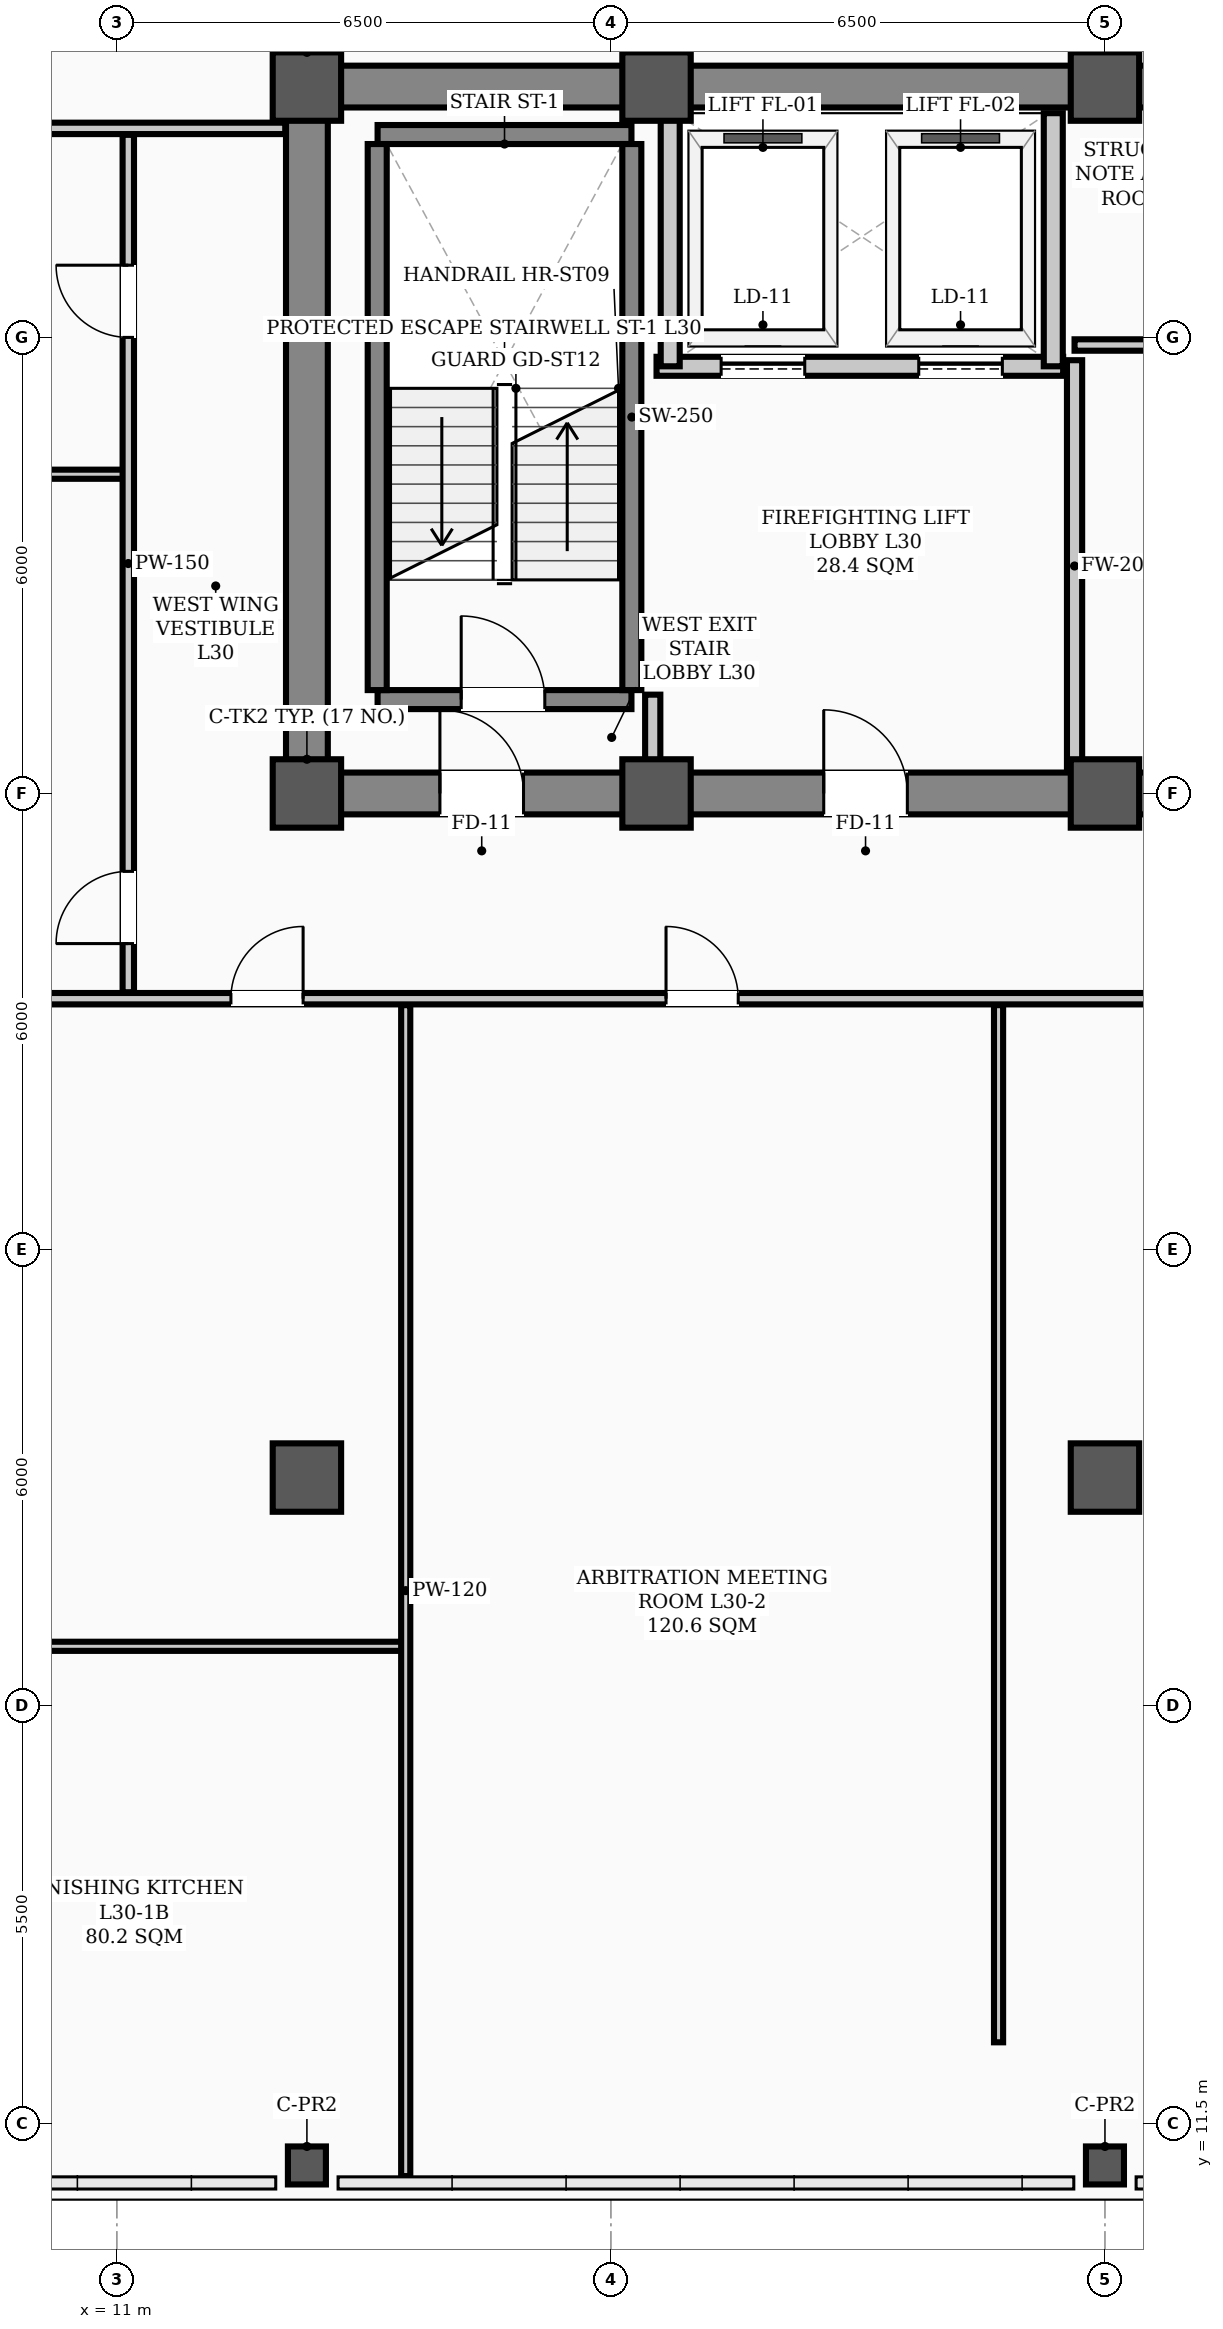
"""IFC4 building model, lengths in metres.
Left out: names, types, materials, properties, quantities, classifications, styles, units other than length and angle.
Written with IfcOpenShell. Run it as: python <this file> out.ifc"""

import sys

from ifc_helpers import new_model, si_unit, direction, frame, frame_2d, origin, origin_2d, place, context, subcontext, project, spatial, rectangle, hollow_rectangle, extrude, element, fill, save


model = new_model("IFC4")
c1 = context("Model", 3, precision=1e-05, world=origin(), true_north=direction((0.0, 1.0)))
c2 = subcontext(c1, "Body", "Model", "MODEL_VIEW")
j1 = project(units=[si_unit("LENGTHUNIT", "METRE"), si_unit("PLANEANGLEUNIT", "RADIAN")], contexts=[c1])
p1 = place(None, origin())
s1 = spatial("IfcSite", under=j1, at=p1, CompositionType="ELEMENT")
p2 = place(p1, origin())
s2 = spatial("IfcBuilding", under=s1, at=p2, CompositionType="ELEMENT")
p3 = place(p2, frame((0.0, 0.0, 122.7)))
s3 = spatial("IfcBuildingStorey", under=s2, at=p3, CompositionType="ELEMENT", Elevation=122.7)
for number, where, z_axis, x_axis in (
    (1, (13.5, 29.0, 0.0), (0.0, 0.0, 1.0), (1.0, 0.0, 0.0)),
    (2, (13.5, 38.3, 0.0), (0.0, 0.0, 1.0), (1.0, 0.0, 0.0)),
    (3, (18.1, 29.0, 0.0), (0.0, 0.0, 1.0), (1.0, 0.0, 0.0)),
    (4, (18.1, 38.3, 0.0), (0.0, 0.0, 1.0), (1.0, 0.0, 0.0)),
    (5, (24.0, 29.0, 0.0), (0.0, 0.0, 1.0), (1.0, 0.0, 0.0)),
    (6, (24.0, 38.3, 0.0), (0.0, 0.0, 1.0), (1.0, 0.0, 0.0)),
    (7, (13.5, 20.0, 0.0), (0.0, 0.0, 1.0), (1.0, 0.0, 0.0)),
    (8, (24.0, 20.0, 0.0), (0.0, 0.0, 1.0), (1.0, 0.0, 0.0)),
):
    element("IfcColumn", number, at=place(p3, frame(where, z_axis=z_axis, x_axis=x_axis)), inside=s3, PredefinedType="COLUMN", context=c2, shape_type="SweptSolid", body=[
        extrude(hollow_rectangle(XDim=0.9, YDim=0.9, WallThickness=0.035, InnerFilletRadius=0.017, OuterFilletRadius=0.052, at=origin_2d()), origin(), (0.0, 0.0, 1.0), 3.9),
    ])
for number, where, z_axis, x_axis in (
    (9, (13.5, 10.95, 0.0), (0.0, 0.0, 1.0), (1.0, 0.0, 0.0)),
    (10, (24.0, 10.95, 0.0), (0.0, 0.0, 1.0), (1.0, 0.0, 0.0)),
):
    element("IfcColumn", number, at=place(p3, frame(where, z_axis=z_axis, x_axis=x_axis)), inside=s3, PredefinedType="COLUMN", context=c2, shape_type="SweptSolid", body=[
        extrude(hollow_rectangle(XDim=0.5, YDim=0.5, WallThickness=0.024, InnerFilletRadius=0.012, OuterFilletRadius=0.036, at=origin_2d()), origin(), (0.0, 0.0, 1.0), 3.9),
    ])
p4 = place(p3, frame((13.5, 29.0, 0.0), z_axis=(0.0, 0.0, 1.0), x_axis=(1.0, 0.0, 0.0)))
e11 = element("IfcWall", 11, at=p4, inside=s3, PredefinedType="SHEAR", context=c2, shape_type="SweptSolid", body=[
    extrude(rectangle(XDim=30.5, YDim=0.55, at=frame_2d((15.25, 0.0))), origin(), (0.0, 0.0, 1.0), 3.72),
])
p5 = place(p4, frame((1.75, 0.0, 0.0)))
e12 = element("IfcOpeningElement", 12, at=p5, cuts=e11, PredefinedType="OPENING", context=c2, shape_type="SweptSolid", body=[
    extrude(rectangle(XDim=1.1, YDim=2.08, at=frame_2d((0.55, 1.04))), frame((0.0, 0.285, 0.0), z_axis=(0.0, -1.0, 0.0), x_axis=(1.0, 0.0, 0.0)), (0.0, 0.0, 1.0), 0.57),
])
p6 = place(p4, frame((26.7, 0.0, 0.0)))
e13 = element("IfcOpeningElement", 13, at=p6, cuts=e11, PredefinedType="OPENING", context=c2, shape_type="SweptSolid", body=[
    extrude(rectangle(XDim=1.1, YDim=2.08, at=frame_2d((0.55, 1.04))), frame((0.0, 0.285, 0.0), z_axis=(0.0, -1.0, 0.0), x_axis=(1.0, 0.0, 0.0)), (0.0, 0.0, 1.0), 0.57),
])
p7 = place(p4, frame((6.8, 0.0, 0.0)))
e14 = element("IfcOpeningElement", 14, at=p7, cuts=e11, PredefinedType="OPENING", context=c2, shape_type="SweptSolid", body=[
    extrude(rectangle(XDim=1.1, YDim=2.08, at=frame_2d((0.55, 1.04))), frame((0.0, 0.285, 0.0), z_axis=(0.0, -1.0, 0.0), x_axis=(1.0, 0.0, 0.0)), (0.0, 0.0, 1.0), 0.57),
])
p8 = place(p4, frame((13.2, 0.0, 0.0)))
e15 = element("IfcOpeningElement", 15, at=p8, cuts=e11, PredefinedType="OPENING", context=c2, shape_type="SweptSolid", body=[
    extrude(rectangle(XDim=1.6, YDim=2.08, at=frame_2d((0.8, 1.04))), frame((0.0, 0.285, 0.0), z_axis=(0.0, -1.0, 0.0), x_axis=(1.0, 0.0, 0.0)), (0.0, 0.0, 1.0), 0.57),
])
p9 = place(p4, frame((20.525, 0.0, 0.0)))
e16 = element("IfcOpeningElement", 16, at=p9, cuts=e11, PredefinedType="OPENING", context=c2, shape_type="SweptSolid", body=[
    extrude(rectangle(XDim=0.95, YDim=2.08, at=frame_2d((0.475, 1.04))), frame((0.0, 0.285, 0.0), z_axis=(0.0, -1.0, 0.0), x_axis=(1.0, 0.0, 0.0)), (0.0, 0.0, 1.0), 0.57),
])
p10 = place(p3, frame((13.5, 38.3, 0.0), z_axis=(0.0, 0.0, 1.0), x_axis=(1.0, 0.0, 0.0)))
e17 = element("IfcWall", 17, at=p10, inside=s3, PredefinedType="SHEAR", context=c2, shape_type="SweptSolid", body=[
    extrude(rectangle(XDim=30.5, YDim=0.55, at=frame_2d((15.25, 0.0))), origin(), (0.0, 0.0, 1.0), 3.72),
])
p11 = place(p3, frame((13.5, 29.35, 0.0), z_axis=(0.0, 0.0, 1.0), x_axis=(0.0, 1.0, 0.0)))
e18 = element("IfcWall", 18, at=p11, inside=s3, PredefinedType="SHEAR", context=c2, shape_type="SweptSolid", body=[
    extrude(rectangle(XDim=8.6, YDim=0.55, at=frame_2d((4.3, 0.0))), origin(), (0.0, 0.0, 1.0), 3.72),
])
p12 = place(p3, frame((14.43, 30.235, 0.0), z_axis=(0.0, 0.0, 1.0), x_axis=(1.0, 0.0, 0.0)))
e19 = element("IfcWall", 19, at=p12, inside=s3, PredefinedType="STANDARD", context=c2, shape_type="SweptSolid", body=[
    extrude(rectangle(XDim=3.34, YDim=0.25, at=frame_2d((1.67, 0.0))), origin(), (0.0, 0.0, 1.0), 3.72),
])
p13 = place(p12, frame((1.1, 0.0, 0.0)))
e20 = element("IfcOpeningElement", 20, at=p13, cuts=e19, PredefinedType="OPENING", context=c2, shape_type="SweptSolid", body=[
    extrude(rectangle(XDim=1.1, YDim=2.08, at=frame_2d((0.55, 1.04))), frame((0.0, 0.135, 0.0), z_axis=(0.0, -1.0, 0.0), x_axis=(1.0, 0.0, 0.0)), (0.0, 0.0, 1.0), 0.27),
])
p14 = place(p3, frame((14.43, 37.669, 0.0), z_axis=(0.0, 0.0, 1.0), x_axis=(1.0, 0.0, 0.0)))
e21 = element("IfcWall", 21, at=p14, inside=s3, PredefinedType="STANDARD", context=c2, shape_type="SweptSolid", body=[
    extrude(rectangle(XDim=3.34, YDim=0.25, at=frame_2d((1.67, 0.0))), origin(), (0.0, 0.0, 1.0), 3.72),
])
for number, where, z_axis, x_axis in (
    (22, (14.425, 30.36, 0.0), (0.0, 0.0, 1.0), (0.0, 1.0, 0.0)),
    (23, (17.775, 30.36, 0.0), (0.0, 0.0, 1.0), (0.0, 1.0, 0.0)),
):
    element("IfcWall", number, at=place(p3, frame(where, z_axis=z_axis, x_axis=x_axis)), inside=s3, PredefinedType="STANDARD", context=c2, shape_type="SweptSolid", body=[
        extrude(rectangle(XDim=7.184, YDim=0.25, at=frame_2d((3.592, 0.0))), origin(), (0.0, 0.0, 1.0), 3.72),
    ])
p15 = place(p3, frame((18.1, 34.62, 0.0), z_axis=(0.0, 0.0, 1.0), x_axis=(1.0, 0.0, 0.0)))
e24 = element("IfcWall", 24, at=p15, inside=s3, PredefinedType="STANDARD", context=c2, shape_type="SweptSolid", body=[
    extrude(rectangle(XDim=5.35, YDim=0.25, at=frame_2d((2.675, 0.0))), origin(), (0.0, 0.0, 1.0), 3.72),
])
p16 = place(p15, frame((0.85, 0.0, 0.0)))
e25 = element("IfcOpeningElement", 25, at=p16, cuts=e24, PredefinedType="OPENING", context=c2, shape_type="SweptSolid", body=[
    extrude(rectangle(XDim=1.1, YDim=2.08, at=frame_2d((0.55, 1.04))), frame((0.0, 0.135, 0.0), z_axis=(0.0, -1.0, 0.0), x_axis=(1.0, 0.0, 0.0)), (0.0, 0.0, 1.0), 0.27),
])
p17 = place(p15, frame((3.45, 0.0, 0.0)))
e26 = element("IfcOpeningElement", 26, at=p17, cuts=e24, PredefinedType="OPENING", context=c2, shape_type="SweptSolid", body=[
    extrude(rectangle(XDim=1.1, YDim=2.08, at=frame_2d((0.55, 1.04))), frame((0.0, 0.135, 0.0), z_axis=(0.0, -1.0, 0.0), x_axis=(1.0, 0.0, 0.0)), (0.0, 0.0, 1.0), 0.27),
])
for number, where, z_axis, x_axis in (
    (27, (18.28, 34.62, 0.0), (0.0, 0.0, 1.0), (0.0, 1.0, 0.0)),
    (28, (23.32, 34.62, 0.0), (0.0, 0.0, 1.0), (0.0, 1.0, 0.0)),
):
    element("IfcWall", number, at=place(p3, frame(where, z_axis=z_axis, x_axis=x_axis)), inside=s3, PredefinedType="STANDARD", context=c2, shape_type="SweptSolid", body=[
        extrude(rectangle(XDim=3.33, YDim=0.25, at=frame_2d((1.665, 0.0))), origin(), (0.0, 0.0, 1.0), 3.72),
    ])
p18 = place(p3, frame((23.6, 34.9, 0.0), z_axis=(0.0, 0.0, 1.0), x_axis=(1.0, 0.0, 0.0)))
e29 = element("IfcWall", 29, at=p18, inside=s3, PredefinedType="PARTITIONING", context=c2, shape_type="SweptSolid", body=[
    extrude(rectangle(XDim=4.58, YDim=0.15, at=frame_2d((2.29, 0.0))), origin(), (0.0, 0.0, 1.0), 3.72),
])
p19 = place(p18, frame((1.875, 0.0, 0.0)))
e30 = element("IfcOpeningElement", 30, at=p19, cuts=e29, PredefinedType="OPENING", context=c2, shape_type="SweptSolid", body=[
    extrude(rectangle(XDim=0.95, YDim=2.08, at=frame_2d((0.475, 1.04))), frame((0.0, 0.085, 0.0), z_axis=(0.0, -1.0, 0.0), x_axis=(1.0, 0.0, 0.0)), (0.0, 0.0, 1.0), 0.17),
])
p20 = place(p3, frame((2.31, 26.3, 0.0), z_axis=(0.0, 0.0, 1.0), x_axis=(1.0, 0.0, 0.0)))
e31 = element("IfcWall", 31, at=p20, inside=s3, PredefinedType="PARTITIONING", context=c2, shape_type="SweptSolid", body=[
    extrude(rectangle(XDim=46.38, YDim=0.15, at=frame_2d((23.19, 0.0))), origin(), (0.0, 0.0, 1.0), 3.1),
])
p21 = place(p20, frame((10.19, 0.0, 0.0)))
e32 = element("IfcOpeningElement", 32, at=p21, cuts=e31, PredefinedType="OPENING", context=c2, shape_type="SweptSolid", body=[
    extrude(rectangle(XDim=0.95, YDim=2.08, at=frame_2d((0.475, 1.04))), frame((0.0, 0.085, 0.0), z_axis=(0.0, -1.0, 0.0), x_axis=(1.0, 0.0, 0.0)), (0.0, 0.0, 1.0), 0.17),
])
p22 = place(p20, frame((15.915, 0.0, 0.0)))
e33 = element("IfcOpeningElement", 33, at=p22, cuts=e31, PredefinedType="OPENING", context=c2, shape_type="SweptSolid", body=[
    extrude(rectangle(XDim=0.95, YDim=2.08, at=frame_2d((0.475, 1.04))), frame((0.0, 0.085, 0.0), z_axis=(0.0, -1.0, 0.0), x_axis=(1.0, 0.0, 0.0)), (0.0, 0.0, 1.0), 0.17),
])
p23 = place(p20, frame((24.115, 0.0, 0.0)))
e34 = element("IfcOpeningElement", 34, at=p23, cuts=e31, PredefinedType="OPENING", context=c2, shape_type="SweptSolid", body=[
    extrude(rectangle(XDim=0.95, YDim=2.08, at=frame_2d((0.475, 1.04))), frame((0.0, 0.085, 0.0), z_axis=(0.0, -1.0, 0.0), x_axis=(1.0, 0.0, 0.0)), (0.0, 0.0, 1.0), 0.17),
])
p24 = place(p20, frame((32.515, 0.0, 0.0)))
e35 = element("IfcOpeningElement", 35, at=p24, cuts=e31, PredefinedType="OPENING", context=c2, shape_type="SweptSolid", body=[
    extrude(rectangle(XDim=0.95, YDim=2.08, at=frame_2d((0.475, 1.04))), frame((0.0, 0.085, 0.0), z_axis=(0.0, -1.0, 0.0), x_axis=(1.0, 0.0, 0.0)), (0.0, 0.0, 1.0), 0.17),
])
p25 = place(p20, frame((37.665, 0.0, 0.0)))
e36 = element("IfcOpeningElement", 36, at=p25, cuts=e31, PredefinedType="OPENING", context=c2, shape_type="SweptSolid", body=[
    extrude(rectangle(XDim=0.95, YDim=2.08, at=frame_2d((0.475, 1.04))), frame((0.0, 0.085, 0.0), z_axis=(0.0, -1.0, 0.0), x_axis=(1.0, 0.0, 0.0)), (0.0, 0.0, 1.0), 0.17),
])
p26 = place(p3, frame((2.31, 37.75, 0.0), z_axis=(0.0, 0.0, 1.0), x_axis=(1.0, 0.0, 0.0)))
e37 = element("IfcWall", 37, at=p26, inside=s3, PredefinedType="PARTITIONING", context=c2, shape_type="SweptSolid", body=[
    extrude(rectangle(XDim=10.905, YDim=0.15, at=frame_2d((5.453, 0.0))), origin(), (0.0, 0.0, 1.0), 3.1),
])
p27 = place(p3, frame((2.31, 17.78, 0.0), z_axis=(0.0, 0.0, 1.0), x_axis=(1.0, 0.0, 0.0)))
e38 = element("IfcWall", 38, at=p27, inside=s3, PredefinedType="PARTITIONING", context=c2, shape_type="SweptSolid", body=[
    extrude(rectangle(XDim=12.49, YDim=0.12, at=frame_2d((6.245, 0.0))), origin(), (0.0, 0.0, 1.0), 3.1),
])
p28 = place(p27, frame((5.77, 0.0, 0.0)))
e39 = element("IfcOpeningElement", 39, at=p28, cuts=e38, PredefinedType="OPENING", context=c2, shape_type="SweptSolid", body=[
    extrude(rectangle(XDim=0.95, YDim=2.08, at=frame_2d((0.475, 1.04))), frame((0.0, 0.07, 0.0), z_axis=(0.0, -1.0, 0.0), x_axis=(1.0, 0.0, 0.0)), (0.0, 0.0, 1.0), 0.14),
])
p29 = place(p3, frame((2.31, 33.2, 0.0), z_axis=(0.0, 0.0, 1.0), x_axis=(1.0, 0.0, 0.0)))
e40 = element("IfcWall", 40, at=p29, inside=s3, PredefinedType="PARTITIONING", context=c2, shape_type="SweptSolid", body=[
    extrude(rectangle(XDim=8.84, YDim=0.12, at=frame_2d((4.42, 0.0))), origin(), (0.0, 0.0, 1.0), 3.72),
])
p30 = place(p3, frame((18.05, 29.285, 0.0), z_axis=(0.0, 0.0, 1.0), x_axis=(0.0, 1.0, 0.0)))
e41 = element("IfcWall", 41, at=p30, inside=s3, PredefinedType="STANDARD", context=c2, shape_type="SweptSolid", body=[
    extrude(rectangle(XDim=1.015, YDim=0.2, at=frame_2d((0.508, 0.0))), origin(), (0.0, 0.0, 1.0), 3.3),
])
p31 = place(p3, frame((23.6, 29.285, 0.0), z_axis=(0.0, 0.0, 1.0), x_axis=(0.0, 1.0, 0.0)))
e42 = element("IfcWall", 42, at=p31, inside=s3, PredefinedType="STANDARD", context=c2, shape_type="SweptSolid", body=[
    extrude(rectangle(XDim=5.415, YDim=0.2, at=frame_2d((2.708, 0.0))), origin(), (0.0, 0.0, 1.0), 3.1),
])
p32 = place(p3, frame((11.15, 26.385, 0.0), z_axis=(0.0, 0.0, 1.0), x_axis=(0.0, 1.0, 0.0)))
e43 = element("IfcWall", 43, at=p32, inside=s3, PredefinedType="PARTITIONING", context=c2, shape_type="SweptSolid", body=[
    extrude(rectangle(XDim=11.28, YDim=0.15, at=frame_2d((5.64, 0.0))), origin(), (0.0, 0.0, 1.0), 3.0),
])
p33 = place(p32, frame((0.64, 0.0, 0.0)))
e44 = element("IfcOpeningElement", 44, at=p33, cuts=e43, PredefinedType="OPENING", context=c2, shape_type="SweptSolid", body=[
    extrude(rectangle(XDim=0.95, YDim=2.08, at=frame_2d((0.475, 1.04))), frame((0.0, 0.085, 0.0), z_axis=(0.0, -1.0, 0.0), x_axis=(1.0, 0.0, 0.0)), (0.0, 0.0, 1.0), 0.17),
])
p34 = place(p32, frame((8.615, 0.0, 0.0)))
e45 = element("IfcOpeningElement", 45, at=p34, cuts=e43, PredefinedType="OPENING", context=c2, shape_type="SweptSolid", body=[
    extrude(rectangle(XDim=0.95, YDim=2.08, at=frame_2d((0.475, 1.04))), frame((0.0, 0.085, 0.0), z_axis=(0.0, -1.0, 0.0), x_axis=(1.0, 0.0, 0.0)), (0.0, 0.0, 1.0), 0.17),
])
p35 = place(p3, frame((14.8, 10.81, 0.0), z_axis=(0.0, 0.0, 1.0), x_axis=(0.0, 1.0, 0.0)))
e46 = element("IfcWall", 46, at=p35, inside=s3, PredefinedType="PARTITIONING", context=c2, shape_type="SweptSolid", body=[
    extrude(rectangle(XDim=15.405, YDim=0.12, at=frame_2d((7.703, 0.0))), origin(), (0.0, 0.0, 1.0), 3.0),
])
p36 = place(p3, frame((22.6, 12.57, 0.0), z_axis=(0.0, 0.0, 1.0), x_axis=(0.0, 1.0, 0.0)))
e47 = element("IfcWall", 47, at=p36, inside=s3, PredefinedType="PARTITIONING", context=c2, shape_type="SweptSolid", body=[
    extrude(rectangle(XDim=13.645, YDim=0.12, at=frame_2d((6.823, 0.0))), origin(), (0.0, 0.0, 1.0), 3.0),
])
p37 = place(p13, origin())
e48 = element("IfcDoor", 48, at=p37, inside=s3, OperationType="SINGLE_SWING_LEFT", PredefinedType="DOOR", context=c2, shape_type="SweptSolid", body=[
    extrude(rectangle(XDim=1.1, YDim=2.08, at=frame_2d((0.55, 1.04))), frame((0.0, 0.025, 0.0), z_axis=(0.0, -1.0, 0.0), x_axis=(1.0, 0.0, 0.0)), (0.0, 0.0, 1.0), 0.05),
])
fill(e20, e48)
p38 = place(p5, origin())
e49 = element("IfcDoor", 49, at=p38, inside=s3, OperationType="SINGLE_SWING_LEFT", PredefinedType="DOOR", context=c2, shape_type="SweptSolid", body=[
    extrude(rectangle(XDim=1.1, YDim=2.08, at=frame_2d((0.55, 1.04))), frame((0.0, 0.025, 0.0), z_axis=(0.0, -1.0, 0.0), x_axis=(1.0, 0.0, 0.0)), (0.0, 0.0, 1.0), 0.05),
])
fill(e12, e49)
p39 = place(p7, origin())
e50 = element("IfcDoor", 50, at=p39, inside=s3, OperationType="SINGLE_SWING_LEFT", PredefinedType="DOOR", context=c2, shape_type="SweptSolid", body=[
    extrude(rectangle(XDim=1.1, YDim=2.08, at=frame_2d((0.55, 1.04))), frame((0.0, 0.025, 0.0), z_axis=(0.0, -1.0, 0.0), x_axis=(1.0, 0.0, 0.0)), (0.0, 0.0, 1.0), 0.05),
])
fill(e14, e50)
p40 = place(p21, origin())
e51 = element("IfcDoor", 51, at=p40, inside=s3, OperationType="SINGLE_SWING_RIGHT", PredefinedType="DOOR", context=c2, shape_type="SweptSolid", body=[
    extrude(rectangle(XDim=0.95, YDim=2.08, at=frame_2d((0.475, 1.04))), frame((0.0, 0.025, 0.0), z_axis=(0.0, -1.0, 0.0), x_axis=(1.0, 0.0, 0.0)), (0.0, 0.0, 1.0), 0.05),
])
fill(e32, e51)
p41 = place(p22, origin())
e52 = element("IfcDoor", 52, at=p41, inside=s3, OperationType="SINGLE_SWING_LEFT", PredefinedType="DOOR", context=c2, shape_type="SweptSolid", body=[
    extrude(rectangle(XDim=0.95, YDim=2.08, at=frame_2d((0.475, 1.04))), frame((0.0, 0.025, 0.0), z_axis=(0.0, -1.0, 0.0), x_axis=(1.0, 0.0, 0.0)), (0.0, 0.0, 1.0), 0.05),
])
fill(e33, e52)
p42 = place(p33, origin())
e53 = element("IfcDoor", 53, at=p42, inside=s3, OperationType="SINGLE_SWING_LEFT", PredefinedType="DOOR", context=c2, shape_type="SweptSolid", body=[
    extrude(rectangle(XDim=0.95, YDim=2.08, at=frame_2d((0.475, 1.04))), frame((0.0, 0.025, 0.0), z_axis=(0.0, -1.0, 0.0), x_axis=(1.0, 0.0, 0.0)), (0.0, 0.0, 1.0), 0.05),
])
fill(e44, e53)
p43 = place(p34, origin())
e54 = element("IfcDoor", 54, at=p43, inside=s3, OperationType="SINGLE_SWING_RIGHT", PredefinedType="DOOR", context=c2, shape_type="SweptSolid", body=[
    extrude(rectangle(XDim=0.95, YDim=2.08, at=frame_2d((0.475, 1.04))), frame((0.0, 0.025, 0.0), z_axis=(0.0, -1.0, 0.0), x_axis=(1.0, 0.0, 0.0)), (0.0, 0.0, 1.0), 0.05),
])
fill(e45, e54)
p44 = place(p16, origin())
e55 = element("IfcDoor", 55, at=p44, inside=s3, OperationType="SLIDING_TO_LEFT", PredefinedType="DOOR", context=c2, shape_type="SweptSolid", body=[
    extrude(rectangle(XDim=1.1, YDim=2.08, at=frame_2d((0.55, 1.04))), frame((0.0, 0.025, 0.0), z_axis=(0.0, -1.0, 0.0), x_axis=(1.0, 0.0, 0.0)), (0.0, 0.0, 1.0), 0.05),
])
fill(e25, e55)
p45 = place(p17, origin())
e56 = element("IfcDoor", 56, at=p45, inside=s3, OperationType="SLIDING_TO_LEFT", PredefinedType="DOOR", context=c2, shape_type="SweptSolid", body=[
    extrude(rectangle(XDim=1.1, YDim=2.08, at=frame_2d((0.55, 1.04))), frame((0.0, 0.025, 0.0), z_axis=(0.0, -1.0, 0.0), x_axis=(1.0, 0.0, 0.0)), (0.0, 0.0, 1.0), 0.05),
])
fill(e26, e56)
save(model, sys.argv[1])
